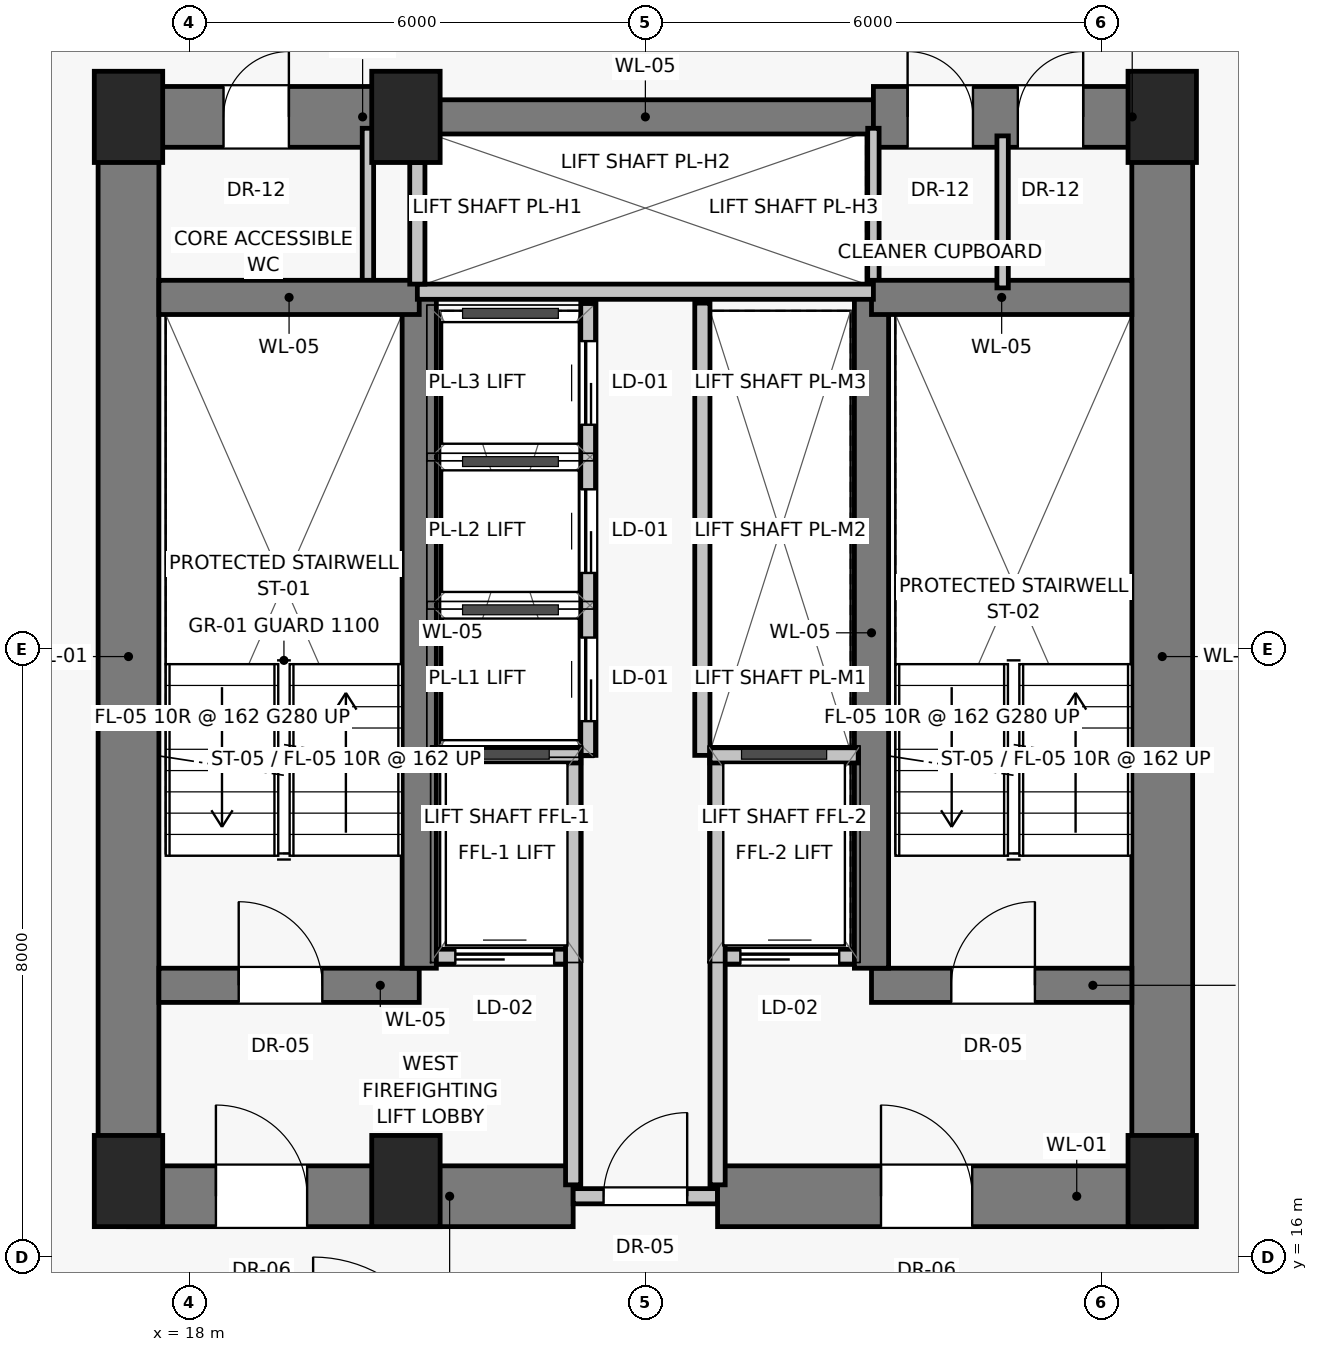
"""IFC4 building model, lengths in metres.
Left out: names, types, materials, properties, quantities, classifications, styles, units other than length and angle.
Written with IfcOpenShell. Run it as: python <this file> out.ifc"""

import sys

from ifc_helpers import new_model, si_unit, direction, frame, frame_2d, origin, origin_2d, place, context, subcontext, project, spatial, rectangle, extrude, source, transform, mapped, element, fill, save


model = new_model("IFC4")
c1 = context("Model", 3, precision=1e-05, world=origin(), true_north=direction((0.0, 1.0)))
c2 = subcontext(c1, "Body", "Model", "MODEL_VIEW")
j1 = project(units=[si_unit("LENGTHUNIT", "METRE"), si_unit("PLANEANGLEUNIT", "RADIAN")], contexts=[c1])
p1 = place(None, origin())
s1 = spatial("IfcSite", under=j1, at=p1, CompositionType="ELEMENT")
p2 = place(p1, origin())
s2 = spatial("IfcBuilding", under=s1, at=p2, CompositionType="ELEMENT")
p3 = place(p2, frame((0.0, 0.0, 50.05)))
s3 = spatial("IfcBuildingStorey", under=s2, at=p3, CompositionType="ELEMENT", Elevation=50.05)
for number, where, z_axis, x_axis in (
    (1, (17.2, 17.0, 0.0), (0.0, 0.0, 1.0), (1.0, 0.0, 0.0)),
    (2, (20.85, 17.0, 0.0), (0.0, 0.0, 1.0), (1.0, 0.0, 0.0)),
    (3, (30.8, 17.0, 0.0), (0.0, 0.0, 1.0), (1.0, 0.0, 0.0)),
    (4, (17.2, 31.0, 0.0), (0.0, 0.0, 1.0), (1.0, 0.0, 0.0)),
    (5, (20.85, 31.0, 0.0), (0.0, 0.0, 1.0), (1.0, 0.0, 0.0)),
    (6, (30.8, 31.0, 0.0), (0.0, 0.0, 1.0), (1.0, 0.0, 0.0)),
):
    element("IfcColumn", number, at=place(p3, frame(where, z_axis=z_axis, x_axis=x_axis)), inside=s3, PredefinedType="PILASTER", context=c2, shape_type="SweptSolid", body=[
        extrude(rectangle(XDim=0.9, YDim=1.2, at=origin_2d()), origin(), (0.0, 0.0, 1.0), 3.25),
    ])
for number, where, z_axis, x_axis in (
    (7, (17.2, 16.8, 0.0), (0.0, 0.0, 1.0), (0.0, 1.0, 0.0)),
    (8, (30.8, 16.8, 0.0), (0.0, 0.0, 1.0), (0.0, 1.0, 0.0)),
):
    element("IfcWall", number, at=place(p3, frame(where, z_axis=z_axis, x_axis=x_axis)), inside=s3, PredefinedType="SHEAR", context=c2, shape_type="SweptSolid", body=[
        extrude(rectangle(XDim=14.2, YDim=0.8, at=frame_2d((7.1, 0.0))), origin(), (0.0, 0.0, 1.0), 3.0),
    ])
p4 = place(p3, frame((17.2, 16.8, 0.0), z_axis=(0.0, 0.0, 1.0), x_axis=(1.0, 0.0, 0.0)))
e9 = element("IfcWall", 9, at=p4, inside=s3, PredefinedType="SHEAR", context=c2, shape_type="SweptSolid", body=[
    extrude(rectangle(XDim=5.85, YDim=0.8, at=frame_2d((2.925, 0.0))), origin(), (0.0, 0.0, 1.0), 3.0),
])
p5 = place(p4, frame((1.15, 0.0, 0.0)))
e10 = element("IfcOpeningElement", 10, at=p5, cuts=e9, PredefinedType="OPENING", context=c2, shape_type="SweptSolid", body=[
    extrude(rectangle(XDim=1.2, YDim=2.03, at=frame_2d((0.6, 1.015))), frame((0.0, 0.41, 0.0), z_axis=(0.0, -1.0, 0.0), x_axis=(1.0, 0.0, 0.0)), (0.0, 0.0, 1.0), 0.82),
])
p6 = place(p3, frame((23.05, 16.8, 0.0), z_axis=(0.0, 0.0, 1.0), x_axis=(1.0, 0.0, 0.0)))
e11 = element("IfcWall", 11, at=p6, inside=s3, PredefinedType="SOLIDWALL", context=c2, shape_type="SweptSolid", body=[
    extrude(rectangle(XDim=1.9, YDim=0.2, at=frame_2d((0.95, 0.0))), origin(), (0.0, 0.0, 1.0), 2.15),
])
p7 = place(p6, frame((0.4, 0.0, 0.0)))
e12 = element("IfcOpeningElement", 12, at=p7, cuts=e11, PredefinedType="OPENING", context=c2, shape_type="SweptSolid", body=[
    extrude(rectangle(XDim=1.1, YDim=2.03, at=frame_2d((0.55, 1.015))), frame((0.0, 0.11, 0.0), z_axis=(0.0, -1.0, 0.0), x_axis=(1.0, 0.0, 0.0)), (0.0, 0.0, 1.0), 0.22),
])
p8 = place(p3, frame((24.95, 16.8, 0.0), z_axis=(0.0, 0.0, 1.0), x_axis=(1.0, 0.0, 0.0)))
e13 = element("IfcWall", 13, at=p8, inside=s3, PredefinedType="SHEAR", context=c2, shape_type="SweptSolid", body=[
    extrude(rectangle(XDim=5.85, YDim=0.8, at=frame_2d((2.925, 0.0))), origin(), (0.0, 0.0, 1.0), 3.0),
])
p9 = place(p8, frame((2.15, 0.0, 0.0)))
e14 = element("IfcOpeningElement", 14, at=p9, cuts=e13, PredefinedType="OPENING", context=c2, shape_type="SweptSolid", body=[
    extrude(rectangle(XDim=1.2, YDim=2.03, at=frame_2d((0.6, 1.015))), frame((0.0, 0.41, 0.0), z_axis=(0.0, -1.0, 0.0), x_axis=(1.0, 0.0, 0.0)), (0.0, 0.0, 1.0), 0.82),
])
p10 = place(p3, frame((17.2, 31.0, 0.0), z_axis=(0.0, 0.0, 1.0), x_axis=(1.0, 0.0, 0.0)))
e15 = element("IfcWall", 15, at=p10, inside=s3, PredefinedType="SHEAR", context=c2, shape_type="SweptSolid", body=[
    extrude(rectangle(XDim=3.8, YDim=0.8, at=frame_2d((1.9, 0.0))), origin(), (0.0, 0.0, 1.0), 3.0),
])
p11 = place(p10, frame((1.25, 0.0, 0.0)))
e16 = element("IfcOpeningElement", 16, at=p11, cuts=e15, PredefinedType="OPENING", context=c2, shape_type="SweptSolid", body=[
    extrude(rectangle(XDim=0.86, YDim=2.01, at=frame_2d((0.43, 1.005))), frame((0.0, 0.41, 0.0), z_axis=(0.0, -1.0, 0.0), x_axis=(1.0, 0.0, 0.0)), (0.0, 0.0, 1.0), 0.82),
])
p12 = place(p3, frame((21.0, 31.0, 0.0), z_axis=(0.0, 0.0, 1.0), x_axis=(1.0, 0.0, 0.0)))
e17 = element("IfcWall", 17, at=p12, inside=s3, PredefinedType="SHEAR", context=c2, shape_type="SweptSolid", body=[
    extrude(rectangle(XDim=6.0, YDim=0.45, at=frame_2d((3.0, 0.0))), origin(), (0.0, 0.0, 1.0), 3.0),
])
p13 = place(p3, frame((27.0, 31.0, 0.0), z_axis=(0.0, 0.0, 1.0), x_axis=(1.0, 0.0, 0.0)))
e18 = element("IfcWall", 18, at=p13, inside=s3, PredefinedType="SHEAR", context=c2, shape_type="SweptSolid", body=[
    extrude(rectangle(XDim=3.8, YDim=0.8, at=frame_2d((1.9, 0.0))), origin(), (0.0, 0.0, 1.0), 3.0),
])
p14 = place(p13, frame((0.45, 0.0, 0.0)))
e19 = element("IfcOpeningElement", 19, at=p14, cuts=e18, PredefinedType="OPENING", context=c2, shape_type="SweptSolid", body=[
    extrude(rectangle(XDim=0.86, YDim=2.01, at=frame_2d((0.43, 1.005))), frame((0.0, 0.41, 0.0), z_axis=(0.0, -1.0, 0.0), x_axis=(1.0, 0.0, 0.0)), (0.0, 0.0, 1.0), 0.82),
])
p15 = place(p13, frame((1.9, 0.0, 0.0)))
e20 = element("IfcOpeningElement", 20, at=p15, cuts=e18, PredefinedType="OPENING", context=c2, shape_type="SweptSolid", body=[
    extrude(rectangle(XDim=0.86, YDim=2.01, at=frame_2d((0.43, 1.005))), frame((0.0, 0.41, 0.0), z_axis=(0.0, -1.0, 0.0), x_axis=(1.0, 0.0, 0.0)), (0.0, 0.0, 1.0), 0.82),
])
for number, where, z_axis, x_axis in (
    (21, (20.35, 28.65, 0.0), (0.0, 0.0, 1.0), (0.0, 1.0, 0.0)),
    (22, (27.0, 28.65, 0.0), (0.0, 0.0, 1.0), (0.0, 1.0, 0.0)),
):
    element("IfcWall", number, at=place(p3, frame(where, z_axis=z_axis, x_axis=x_axis)), inside=s3, PredefinedType="PARTITIONING", context=c2, shape_type="SweptSolid", body=[
        extrude(rectangle(XDim=2.2, YDim=0.15, at=frame_2d((1.1, 0.0))), origin(), (0.0, 0.0, 1.0), 3.0),
    ])
p16 = place(p3, frame((17.6, 19.575, 0.0), z_axis=(0.0, 0.0, 1.0), x_axis=(1.0, 0.0, 0.0)))
e23 = element("IfcWall", 23, at=p16, inside=s3, PredefinedType="SHEAR", context=c2, shape_type="SweptSolid", body=[
    extrude(rectangle(XDim=3.425, YDim=0.45, at=frame_2d((1.712, 0.0))), origin(), (0.0, 0.0, 1.0), 3.0),
])
p17 = place(p16, frame((1.05, 0.0, 0.0)))
e24 = element("IfcOpeningElement", 24, at=p17, cuts=e23, PredefinedType="OPENING", context=c2, shape_type="SweptSolid", body=[
    extrude(rectangle(XDim=1.1, YDim=2.03, at=frame_2d((0.55, 1.015))), frame((0.0, 0.235, 0.0), z_axis=(0.0, -1.0, 0.0), x_axis=(1.0, 0.0, 0.0)), (0.0, 0.0, 1.0), 0.47),
])
p18 = place(p3, frame((21.2, 19.95, 0.0), z_axis=(0.0, 0.0, 1.0), x_axis=(1.0, 0.0, 0.0)))
e25 = element("IfcWall", 25, at=p18, inside=s3, PredefinedType="SOLIDWALL", context=c2, shape_type="SweptSolid", body=[
    extrude(rectangle(XDim=1.85, YDim=0.2, at=frame_2d((0.925, 0.0))), origin(), (0.0, 0.0, 1.0), 3.0),
])
p19 = place(p18, frame((0.3, 0.0, 0.0)))
e26 = element("IfcOpeningElement", 26, at=p19, cuts=e25, PredefinedType="OPENING", context=c2, shape_type="SweptSolid", body=[
    extrude(rectangle(XDim=1.3, YDim=2.25, at=frame_2d((0.65, 1.125))), frame((0.0, 0.11, 0.0), z_axis=(0.0, -1.0, 0.0), x_axis=(1.0, 0.0, 0.0)), (0.0, 0.0, 1.0), 0.22),
])
p20 = place(p3, frame((24.95, 19.95, 0.0), z_axis=(0.0, 0.0, 1.0), x_axis=(1.0, 0.0, 0.0)))
e27 = element("IfcWall", 27, at=p20, inside=s3, PredefinedType="SOLIDWALL", context=c2, shape_type="SweptSolid", body=[
    extrude(rectangle(XDim=1.85, YDim=0.2, at=frame_2d((0.925, 0.0))), origin(), (0.0, 0.0, 1.0), 3.0),
])
p21 = place(p20, frame((0.3, 0.0, 0.0)))
e28 = element("IfcOpeningElement", 28, at=p21, cuts=e27, PredefinedType="OPENING", context=c2, shape_type="SweptSolid", body=[
    extrude(rectangle(XDim=1.3, YDim=2.25, at=frame_2d((0.65, 1.125))), frame((0.0, 0.11, 0.0), z_axis=(0.0, -1.0, 0.0), x_axis=(1.0, 0.0, 0.0)), (0.0, 0.0, 1.0), 0.22),
])
p22 = place(p3, frame((26.975, 19.575, 0.0), z_axis=(0.0, 0.0, 1.0), x_axis=(1.0, 0.0, 0.0)))
e29 = element("IfcWall", 29, at=p22, inside=s3, PredefinedType="SHEAR", context=c2, shape_type="SweptSolid", body=[
    extrude(rectangle(XDim=3.425, YDim=0.45, at=frame_2d((1.712, 0.0))), origin(), (0.0, 0.0, 1.0), 3.0),
])
p23 = place(p22, frame((1.05, 0.0, 0.0)))
e30 = element("IfcOpeningElement", 30, at=p23, cuts=e29, PredefinedType="OPENING", context=c2, shape_type="SweptSolid", body=[
    extrude(rectangle(XDim=1.1, YDim=2.03, at=frame_2d((0.55, 1.015))), frame((0.0, 0.235, 0.0), z_axis=(0.0, -1.0, 0.0), x_axis=(1.0, 0.0, 0.0)), (0.0, 0.0, 1.0), 0.47),
])
for number, where, z_axis, x_axis in (
    (31, (21.025, 19.8, 0.0), (0.0, 0.0, 1.0), (0.0, 1.0, 0.0)),
    (32, (26.975, 19.8, 0.0), (0.0, 0.0, 1.0), (0.0, 1.0, 0.0)),
):
    element("IfcWall", number, at=place(p3, frame(where, z_axis=z_axis, x_axis=x_axis)), inside=s3, PredefinedType="SHEAR", context=c2, shape_type="SweptSolid", body=[
        extrude(rectangle(XDim=8.825, YDim=0.45, at=frame_2d((4.413, 0.0))), origin(), (0.0, 0.0, 1.0), 3.0),
    ])
for number, where, z_axis, x_axis in (
    (33, (17.6, 28.625, 0.0), (0.0, 0.0, 1.0), (1.0, 0.0, 0.0)),
    (34, (26.975, 28.625, 0.0), (0.0, 0.0, 1.0), (1.0, 0.0, 0.0)),
):
    element("IfcWall", number, at=place(p3, frame(where, z_axis=z_axis, x_axis=x_axis)), inside=s3, PredefinedType="SHEAR", context=c2, shape_type="SweptSolid", body=[
        extrude(rectangle(XDim=3.425, YDim=0.45, at=frame_2d((1.712, 0.0))), origin(), (0.0, 0.0, 1.0), 3.0),
    ])
for number, where, z_axis, x_axis in (
    (35, (23.05, 16.95, 0.0), (0.0, 0.0, 1.0), (0.0, 1.0, 0.0)),
    (36, (24.95, 16.95, 0.0), (0.0, 0.0, 1.0), (0.0, 1.0, 0.0)),
):
    element("IfcWall", number, at=place(p3, frame(where, z_axis=z_axis, x_axis=x_axis)), inside=s3, PredefinedType="SOLIDWALL", context=c2, shape_type="SweptSolid", body=[
        extrude(rectangle(XDim=5.6, YDim=0.2, at=frame_2d((2.8, 0.0))), origin(), (0.0, 0.0, 1.0), 3.0),
    ])
for number, where, z_axis, x_axis in (
    (37, (21.2, 22.6, 0.0), (0.0, 0.0, 1.0), (1.0, 0.0, 0.0)),
    (38, (24.85, 22.6, 0.0), (0.0, 0.0, 1.0), (1.0, 0.0, 0.0)),
):
    element("IfcWall", number, at=place(p3, frame(where, z_axis=z_axis, x_axis=x_axis)), inside=s3, PredefinedType="SOLIDWALL", context=c2, shape_type="SweptSolid", body=[
        extrude(rectangle(XDim=1.95, YDim=0.2, at=frame_2d((0.975, 0.0))), origin(), (0.0, 0.0, 1.0), 3.0),
    ])
p24 = place(p3, frame((21.0, 28.7, 0.0), z_axis=(0.0, 0.0, 1.0), x_axis=(1.0, 0.0, 0.0)))
e39 = element("IfcWall", 39, at=p24, inside=s3, PredefinedType="SOLIDWALL", context=c2, shape_type="SweptSolid", body=[
    extrude(rectangle(XDim=6.0, YDim=0.2, at=frame_2d((3.0, 0.0))), origin(), (0.0, 0.0, 1.0), 3.0),
])
p25 = place(p3, frame((21.0, 28.8, 0.0), z_axis=(0.0, 0.0, 1.0), x_axis=(0.0, 1.0, 0.0)))
e40 = element("IfcWall", 40, at=p25, inside=s3, PredefinedType="SOLIDWALL", context=c2, shape_type="SweptSolid", body=[
    extrude(rectangle(XDim=1.6, YDim=0.2, at=frame_2d((0.8, 0.0))), origin(), (0.0, 0.0, 1.0), 3.0),
])
p26 = place(p3, frame((23.25, 22.6, 0.0), z_axis=(0.0, 0.0, 1.0), x_axis=(0.0, 1.0, 0.0)))
e41 = element("IfcWall", 41, at=p26, inside=s3, PredefinedType="SOLIDWALL", context=c2, shape_type="SweptSolid", body=[
    extrude(rectangle(XDim=5.95, YDim=0.2, at=frame_2d((2.975, 0.0))), origin(), (0.0, 0.0, 1.0), 3.0),
])
p27 = place(p26, frame((0.45, 0.0, 0.0)))
e42 = element("IfcOpeningElement", 42, at=p27, cuts=e41, PredefinedType="OPENING", context=c2, shape_type="SweptSolid", body=[
    extrude(rectangle(XDim=1.1, YDim=2.08, at=frame_2d((0.55, 1.04))), frame((0.0, 0.11, 0.0), z_axis=(0.0, -1.0, 0.0), x_axis=(1.0, 0.0, 0.0)), (0.0, 0.0, 1.0), 0.22),
])
p28 = place(p26, frame((2.4, 0.0, 0.0)))
e43 = element("IfcOpeningElement", 43, at=p28, cuts=e41, PredefinedType="OPENING", context=c2, shape_type="SweptSolid", body=[
    extrude(rectangle(XDim=1.1, YDim=2.08, at=frame_2d((0.55, 1.04))), frame((0.0, 0.11, 0.0), z_axis=(0.0, -1.0, 0.0), x_axis=(1.0, 0.0, 0.0)), (0.0, 0.0, 1.0), 0.22),
])
p29 = place(p26, frame((4.35, 0.0, 0.0)))
e44 = element("IfcOpeningElement", 44, at=p29, cuts=e41, PredefinedType="OPENING", context=c2, shape_type="SweptSolid", body=[
    extrude(rectangle(XDim=1.1, YDim=2.08, at=frame_2d((0.55, 1.04))), frame((0.0, 0.11, 0.0), z_axis=(0.0, -1.0, 0.0), x_axis=(1.0, 0.0, 0.0)), (0.0, 0.0, 1.0), 0.22),
])
p30 = place(p3, frame((24.75, 22.6, 0.0), z_axis=(0.0, 0.0, 1.0), x_axis=(0.0, 1.0, 0.0)))
e45 = element("IfcWall", 45, at=p30, inside=s3, PredefinedType="SOLIDWALL", context=c2, shape_type="SweptSolid", body=[
    extrude(rectangle(XDim=5.95, YDim=0.2, at=frame_2d((2.975, 0.0))), origin(), (0.0, 0.0, 1.0), 3.0),
])
p31 = place(p3, frame((28.7, 28.75, 0.0), z_axis=(0.0, 0.0, 1.0), x_axis=(0.0, 1.0, 0.0)))
e46 = element("IfcWall", 46, at=p31, inside=s3, PredefinedType="PARTITIONING", context=c2, shape_type="SweptSolid", body=[
    extrude(rectangle(XDim=2.0, YDim=0.15, at=frame_2d((1.0, 0.0))), origin(), (0.0, 0.0, 1.0), 3.0),
])
m1 = source(origin(), c2, "Body", "SweptSolid", [
    extrude(rectangle(XDim=1.2, YDim=2.03, at=frame_2d((0.6, 1.015))), frame((0.0, 0.025, 0.0), z_axis=(0.0, -1.0, 0.0), x_axis=(1.0, 0.0, 0.0)), (0.0, 0.0, 1.0), 0.05),
])
p32 = place(p5, origin())
e47 = element("IfcDoor", 47, at=p32, inside=s3, OperationType="SINGLE_SWING_LEFT", PredefinedType="DOOR", context=c2, shape_type="MappedRepresentation", body=[
    mapped(m1, transform((0.0, 0.0, 0.0), scale=1.0)),
])
fill(e10, e47)
m2 = source(origin(), c2, "Body", "SweptSolid", [
    extrude(rectangle(XDim=1.1, YDim=2.03, at=frame_2d((0.55, 1.015))), frame((0.0, 0.025, 0.0), z_axis=(0.0, -1.0, 0.0), x_axis=(1.0, 0.0, 0.0)), (0.0, 0.0, 1.0), 0.05),
])
p33 = place(p7, origin())
e48 = element("IfcDoor", 48, at=p33, inside=s3, OperationType="SINGLE_SWING_RIGHT", PredefinedType="DOOR", context=c2, shape_type="MappedRepresentation", body=[
    mapped(m2, transform((0.0, 0.0, 0.0), scale=1.0)),
])
fill(e12, e48)
p34 = place(p9, origin())
e49 = element("IfcDoor", 49, at=p34, inside=s3, OperationType="SINGLE_SWING_LEFT", PredefinedType="DOOR", context=c2, shape_type="MappedRepresentation", body=[
    mapped(m1, transform((0.0, 0.0, 0.0), scale=1.0)),
])
fill(e14, e49)
m3 = source(origin(), c2, "Body", "SweptSolid", [
    extrude(rectangle(XDim=0.86, YDim=2.01, at=frame_2d((0.43, 1.005))), frame((0.0, 0.025, 0.0), z_axis=(0.0, -1.0, 0.0), x_axis=(1.0, 0.0, 0.0)), (0.0, 0.0, 1.0), 0.05),
])
p35 = place(p11, origin())
e50 = element("IfcDoor", 50, at=p35, inside=s3, OperationType="SINGLE_SWING_RIGHT", PredefinedType="DOOR", context=c2, shape_type="MappedRepresentation", body=[
    mapped(m3, transform((0.0, 0.0, 0.0), scale=1.0)),
])
fill(e16, e50)
p36 = place(p14, origin())
e51 = element("IfcDoor", 51, at=p36, inside=s3, OperationType="SINGLE_SWING_LEFT", PredefinedType="DOOR", context=c2, shape_type="MappedRepresentation", body=[
    mapped(m3, transform((0.0, 0.0, 0.0), scale=1.0)),
])
fill(e19, e51)
p37 = place(p15, origin())
e52 = element("IfcDoor", 52, at=p37, inside=s3, OperationType="SINGLE_SWING_RIGHT", PredefinedType="DOOR", context=c2, shape_type="MappedRepresentation", body=[
    mapped(m3, transform((0.0, 0.0, 0.0), scale=1.0)),
])
fill(e20, e52)
p38 = place(p17, origin())
e53 = element("IfcDoor", 53, at=p38, inside=s3, OperationType="SINGLE_SWING_LEFT", PredefinedType="DOOR", context=c2, shape_type="MappedRepresentation", body=[
    mapped(m2, transform((0.0, 0.0, 0.0), scale=1.0)),
])
fill(e24, e53)
m4 = source(origin(), c2, "Body", "SweptSolid", [
    extrude(rectangle(XDim=1.3, YDim=2.25, at=frame_2d((0.65, 1.125))), frame((0.0, 0.025, 0.0), z_axis=(0.0, -1.0, 0.0), x_axis=(1.0, 0.0, 0.0)), (0.0, 0.0, 1.0), 0.05),
])
p39 = place(p19, origin())
e54 = element("IfcDoor", 54, at=p39, inside=s3, OperationType="SLIDING_TO_LEFT", PredefinedType="DOOR", context=c2, shape_type="MappedRepresentation", body=[
    mapped(m4, transform((0.0, 0.0, 0.0), scale=1.0)),
])
fill(e26, e54)
p40 = place(p21, origin())
e55 = element("IfcDoor", 55, at=p40, inside=s3, OperationType="SLIDING_TO_LEFT", PredefinedType="DOOR", context=c2, shape_type="MappedRepresentation", body=[
    mapped(m4, transform((0.0, 0.0, 0.0), scale=1.0)),
])
fill(e28, e55)
p41 = place(p23, origin())
e56 = element("IfcDoor", 56, at=p41, inside=s3, OperationType="SINGLE_SWING_RIGHT", PredefinedType="DOOR", context=c2, shape_type="MappedRepresentation", body=[
    mapped(m2, transform((0.0, 0.0, 0.0), scale=1.0)),
])
fill(e30, e56)
m5 = source(origin(), c2, "Body", "SweptSolid", [
    extrude(rectangle(XDim=1.1, YDim=2.08, at=frame_2d((0.55, 1.04))), frame((0.0, 0.025, 0.0), z_axis=(0.0, -1.0, 0.0), x_axis=(1.0, 0.0, 0.0)), (0.0, 0.0, 1.0), 0.05),
])
p42 = place(p27, origin())
e57 = element("IfcDoor", 57, at=p42, inside=s3, OperationType="SLIDING_TO_LEFT", PredefinedType="DOOR", context=c2, shape_type="MappedRepresentation", body=[
    mapped(m5, transform((0.0, 0.0, 0.0), scale=1.0)),
])
fill(e42, e57)
p43 = place(p28, origin())
e58 = element("IfcDoor", 58, at=p43, inside=s3, OperationType="SLIDING_TO_LEFT", PredefinedType="DOOR", context=c2, shape_type="MappedRepresentation", body=[
    mapped(m5, transform((0.0, 0.0, 0.0), scale=1.0)),
])
fill(e43, e58)
p44 = place(p29, origin())
e59 = element("IfcDoor", 59, at=p44, inside=s3, OperationType="SLIDING_TO_LEFT", PredefinedType="DOOR", context=c2, shape_type="MappedRepresentation", body=[
    mapped(m5, transform((0.0, 0.0, 0.0), scale=1.0)),
])
fill(e44, e59)
save(model, sys.argv[1])
